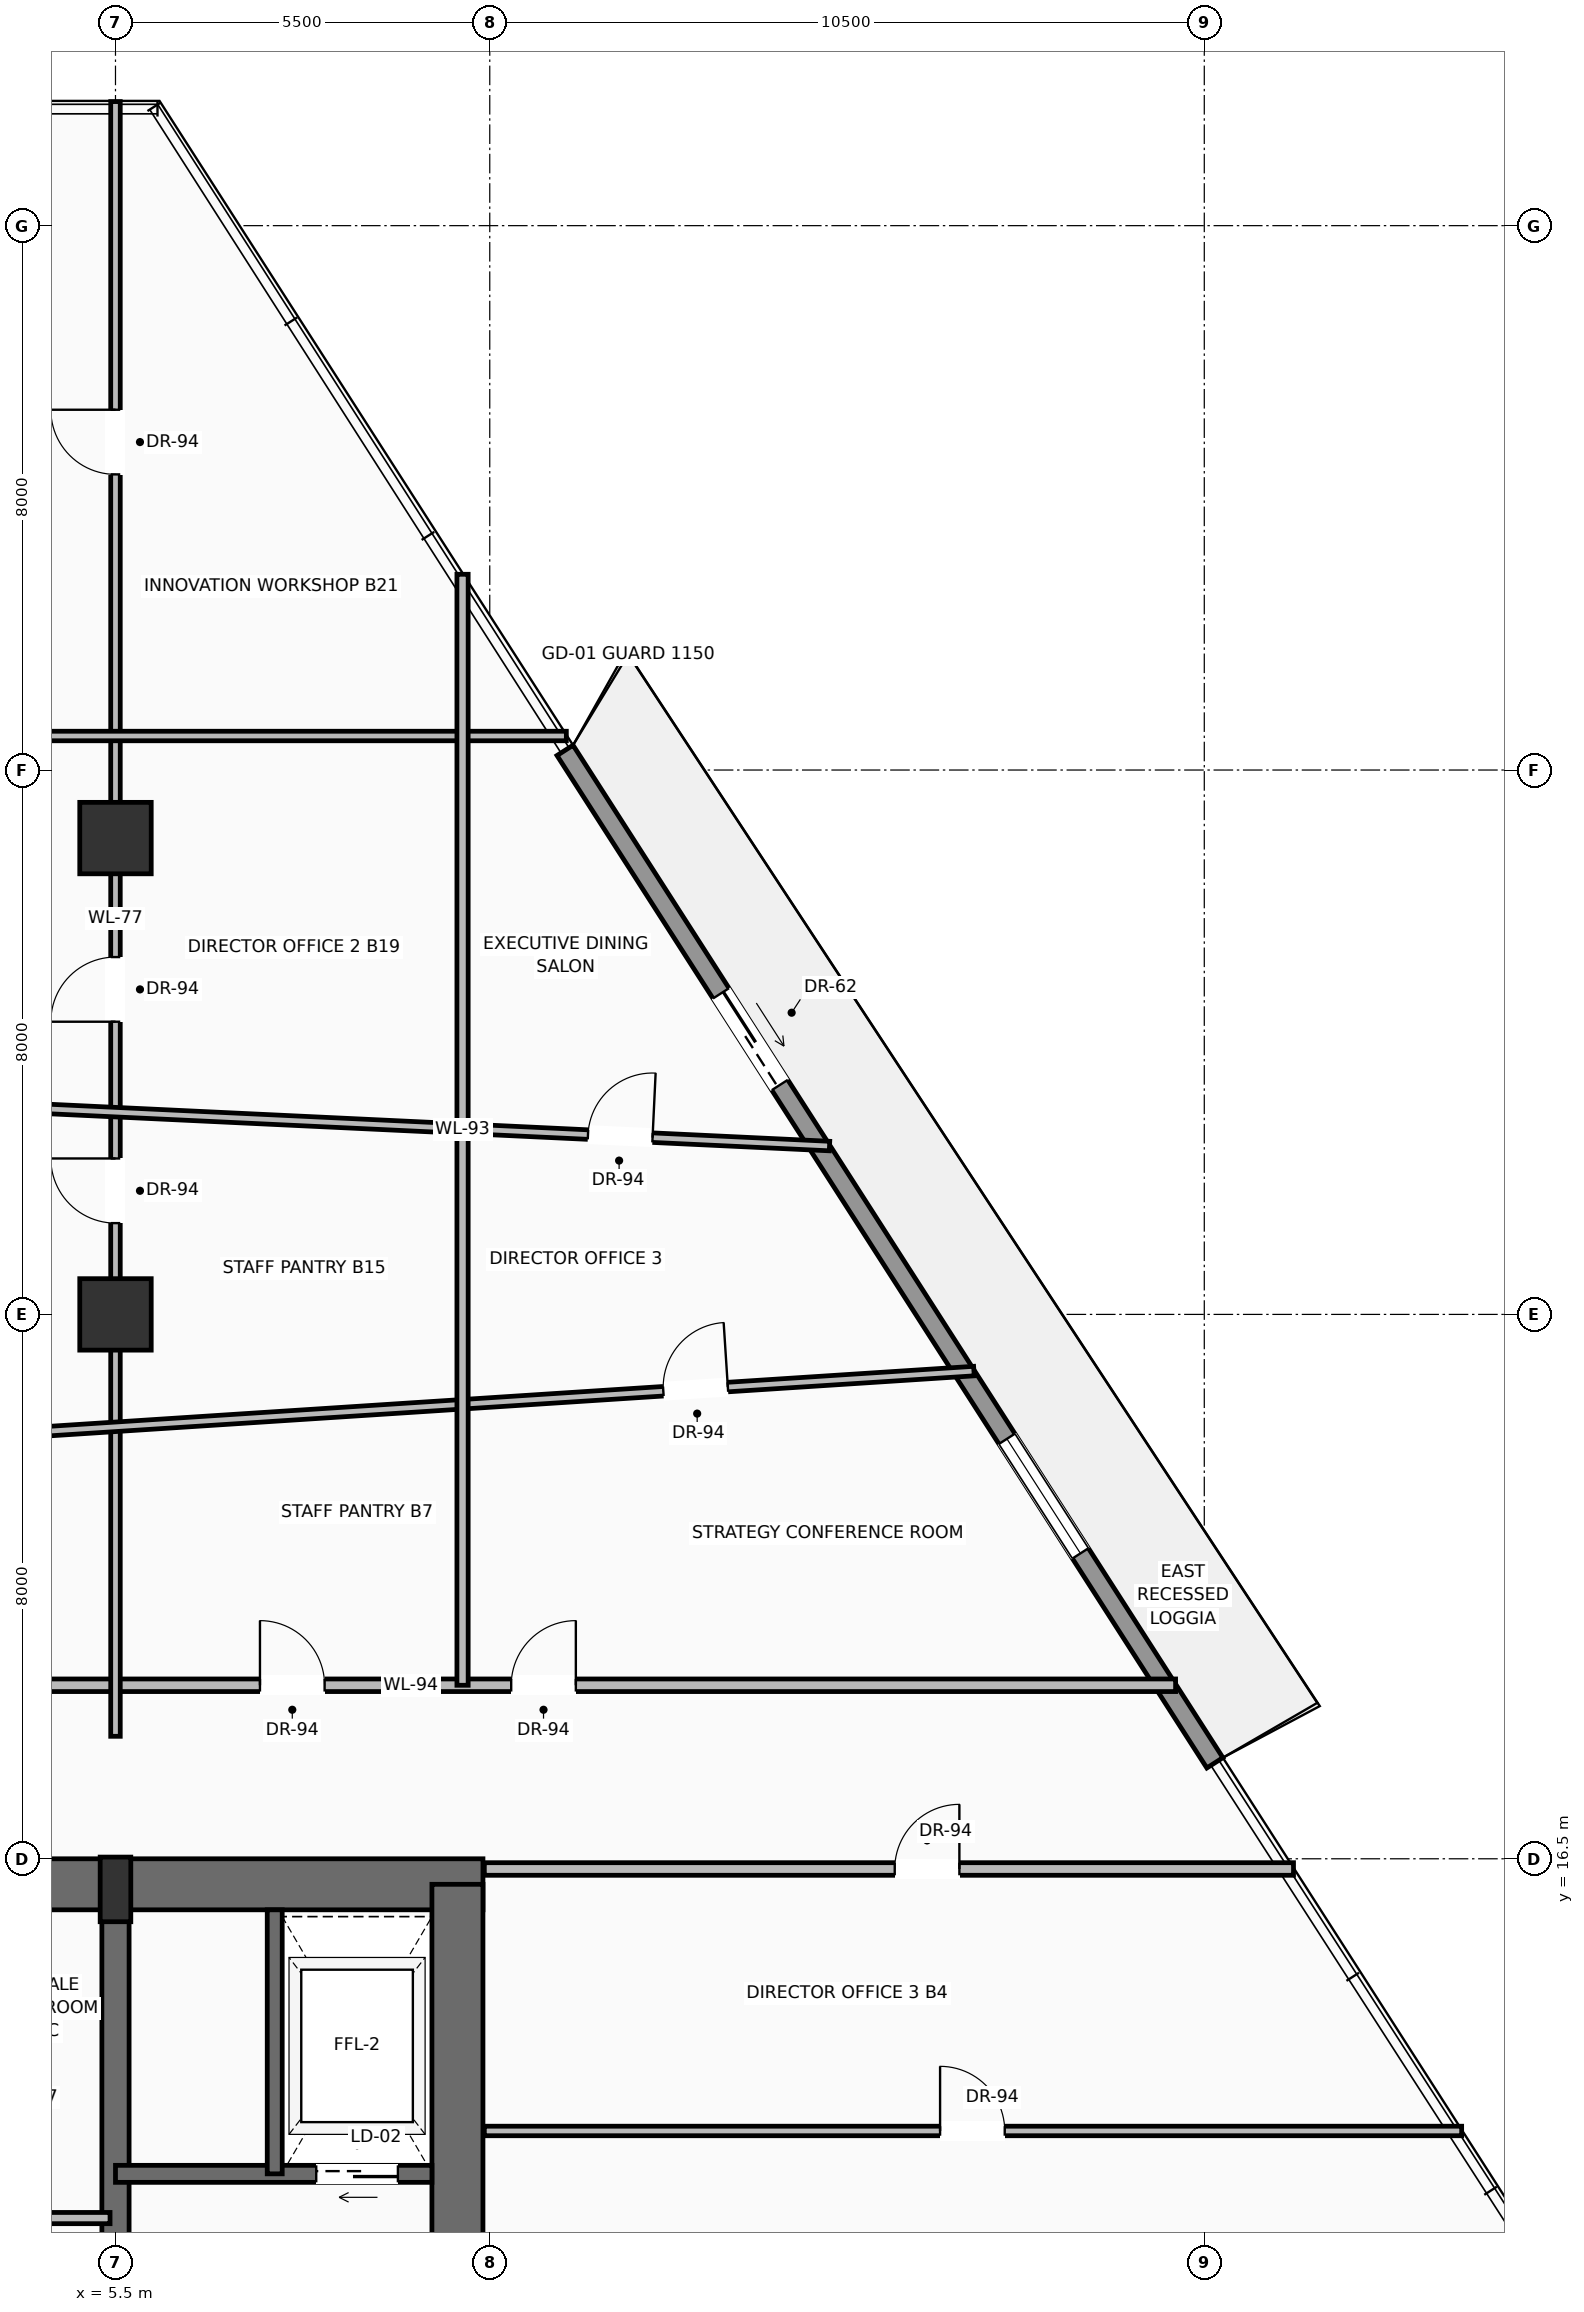
"""IFC4 building model, lengths in metres.
Left out: names, types, materials, properties, quantities, classifications, styles, units other than length and angle.
Written with IfcOpenShell. Run it as: python <this file> out.ifc"""

import sys

from ifc_helpers import new_model, si_unit, direction, frame, frame_2d, origin, origin_2d, place, context, subcontext, project, spatial, rectangle, extrude, source, transform, mapped, element, fill, save


model = new_model("IFC4")
c1 = context("Model", 3, precision=1e-05, world=origin(), true_north=direction((0.0, 1.0)))
c2 = subcontext(c1, "Body", "Model", "MODEL_VIEW")
j1 = project(units=[si_unit("LENGTHUNIT", "METRE"), si_unit("PLANEANGLEUNIT", "RADIAN")], contexts=[c1])
p1 = place(None, origin())
s1 = spatial("IfcSite", under=j1, at=p1, CompositionType="ELEMENT")
p2 = place(p1, origin())
s2 = spatial("IfcBuilding", under=s1, at=p2, CompositionType="ELEMENT")
p3 = place(p2, frame((0.0, 0.0, 113.6)))
s3 = spatial("IfcBuildingStorey", under=s2, at=p3, CompositionType="ELEMENT", Elevation=113.6)
p4 = place(p3, frame((-10.9, 16.125, 0.0), z_axis=(0.0, 0.0, 1.0), x_axis=(1.0, 0.0, 0.0)))
e1 = element("IfcWall", 1, at=p4, inside=s3, PredefinedType="SHEAR", context=c2, shape_type="SweptSolid", body=[
    extrude(rectangle(XDim=21.8, YDim=0.75, at=frame_2d((10.9, 0.0))), origin(), (0.0, 0.0, 1.0), 3.45),
])
p5 = place(p4, frame((3.47, 0.0, 0.0)))
e2 = element("IfcOpeningElement", 2, at=p5, cuts=e1, PredefinedType="OPENING", context=c2, shape_type="SweptSolid", body=[
    extrude(rectangle(XDim=1.3, YDim=2.3, at=frame_2d((0.65, 1.15))), frame((0.0, 0.385, 0.0), z_axis=(0.0, -1.0, 0.0), x_axis=(1.0, 0.0, 0.0)), (0.0, 0.0, 1.0), 0.77),
])
p6 = place(p4, frame((9.9, 0.0, 0.0)))
e3 = element("IfcOpeningElement", 3, at=p6, cuts=e1, PredefinedType="OPENING", context=c2, shape_type="SweptSolid", body=[
    extrude(rectangle(XDim=2.0, YDim=2.4, at=frame_2d((1.0, 1.2))), frame((0.0, 0.385, 0.0), z_axis=(0.0, -1.0, 0.0), x_axis=(1.0, 0.0, 0.0)), (0.0, 0.0, 1.0), 0.77),
])
p7 = place(p3, frame((10.525, 0.475, 0.0), z_axis=(0.0, 0.0, 1.0), x_axis=(0.0, 1.0, 0.0)))
e4 = element("IfcWall", 4, at=p7, inside=s3, PredefinedType="SHEAR", context=c2, shape_type="SweptSolid", body=[
    extrude(rectangle(XDim=15.65, YDim=0.75, at=frame_2d((7.825, 0.0))), origin(), (0.0, 0.0, 1.0), 3.45),
])
p8 = place(p3, frame((5.5, 0.475, 0.0), z_axis=(0.0, 0.0, 1.0), x_axis=(0.0, 1.0, 0.0)))
e5 = element("IfcWall", 5, at=p8, inside=s3, PredefinedType="SHEAR", context=c2, shape_type="SweptSolid", body=[
    extrude(rectangle(XDim=15.65, YDim=0.4, at=frame_2d((7.825, 0.0))), origin(), (0.0, 0.0, 1.0), 3.45),
])
p9 = place(p8, frame((9.025, 0.0, 0.0)))
e6 = element("IfcOpeningElement", 6, at=p9, cuts=e5, PredefinedType="OPENING", context=c2, shape_type="SweptSolid", body=[
    extrude(rectangle(XDim=1.1, YDim=2.2, at=frame_2d((0.55, 1.1))), frame((0.0, 0.21, 0.0), z_axis=(0.0, -1.0, 0.0), x_axis=(1.0, 0.0, 0.0)), (0.0, 0.0, 1.0), 0.42),
])
m1 = source(origin(), c2, "Body", "SweptSolid", [
    extrude(rectangle(XDim=0.45, YDim=0.95, at=origin_2d()), origin(), (0.0, 0.0, 1.0), 3.7),
])
p10 = place(p3, frame((5.5, 16.05, 0.0), z_axis=(0.0, 0.0, 1.0), x_axis=(1.0, 0.0, 0.0)))
e7 = element("IfcColumn", 7, at=p10, inside=s3, PredefinedType="PILASTER", context=c2, shape_type="MappedRepresentation", body=[
    mapped(m1, transform((0.0, 0.0, 0.0), scale=1.0)),
])
m2 = source(origin(), c2, "Body", "SweptSolid", [
    extrude(rectangle(XDim=1.05, YDim=1.05, at=origin_2d()), origin(), (0.0, 0.0, 1.0), 3.7),
])
for number, where, z_axis, x_axis in (
    (8, (5.5, 24.5, 0.0), (0.0, 0.0, 1.0), (1.0, 0.0, 0.0)),
    (9, (5.5, 31.5, 0.0), (0.0, 0.0, 1.0), (1.0, 0.0, 0.0)),
):
    element("IfcColumn", number, at=place(p3, frame(where, z_axis=z_axis, x_axis=x_axis)), inside=s3, PredefinedType="COLUMN", context=c2, shape_type="MappedRepresentation", body=[
        mapped(m2, transform((0.0, 0.0, 0.0), scale=1.0)),
    ])
p11 = place(p3, frame((12.106, 32.789, 0.0), z_axis=(0.0, 0.0, 1.0), x_axis=(0.540123023737, -0.841586073571, 0.0)))
e10 = element("IfcWall", 10, at=p11, inside=s3, PredefinedType="SOLIDWALL", context=c2, shape_type="SweptSolid", body=[
    extrude(rectangle(XDim=17.68, YDim=0.28, at=frame_2d((8.84, 0.0))), origin(), (0.0, 0.0, 1.0), 3.03),
])
p12 = place(p11, frame((4.243, 0.0, 0.0)))
e11 = element("IfcOpeningElement", 11, at=p12, cuts=e10, PredefinedType="OPENING", context=c2, shape_type="SweptSolid", body=[
    extrude(rectangle(XDim=1.6, YDim=2.35, at=frame_2d((0.8, 1.175))), frame((0.0, 0.15, 0.0), z_axis=(0.0, -1.0, 0.0), x_axis=(1.0, 0.0, 0.0)), (0.0, 0.0, 1.0), 0.3),
])
p13 = place(p11, frame((12.022, 0.0, 0.9)))
e12 = element("IfcOpeningElement", 12, at=p13, cuts=e10, PredefinedType="OPENING", context=c2, shape_type="SweptSolid", body=[
    extrude(rectangle(XDim=2.0, YDim=1.85, at=frame_2d((1.0, 0.925))), frame((0.0, 0.15, 0.0), z_axis=(0.0, -1.0, 0.0), x_axis=(1.0, 0.0, 0.0)), (0.0, 0.0, 1.0), 0.3),
])
p14 = place(p3, frame((10.15, 11.87, 0.0), z_axis=(0.0, 0.0, 1.0), x_axis=(-1.0, 0.0, 0.0)))
e13 = element("IfcWall", 13, at=p14, inside=s3, PredefinedType="SOLIDWALL", context=c2, shape_type="SweptSolid", body=[
    extrude(rectangle(XDim=4.65, YDim=0.25, at=frame_2d((2.325, 0.0))), origin(), (0.0, 0.0, 1.0), 3.45),
])
p15 = place(p14, frame((0.5, 0.0, 0.0)))
e14 = element("IfcOpeningElement", 14, at=p15, cuts=e13, PredefinedType="OPENING", context=c2, shape_type="SweptSolid", body=[
    extrude(rectangle(XDim=1.2, YDim=2.25, at=frame_2d((0.6, 1.125))), frame((0.0, 0.135, 0.0), z_axis=(0.0, -1.0, 0.0), x_axis=(1.0, 0.0, 0.0)), (0.0, 0.0, 1.0), 0.27),
])
p16 = place(p3, frame((7.84, 11.87, 0.0), z_axis=(0.0, 0.0, 1.0), x_axis=(0.0, 1.0, 0.0)))
e15 = element("IfcWall", 15, at=p16, inside=s3, PredefinedType="SOLIDWALL", context=c2, shape_type="SweptSolid", body=[
    extrude(rectangle(XDim=3.88, YDim=0.22, at=frame_2d((1.94, 0.0))), origin(), (0.0, 0.0, 1.0), 3.45),
])
p17 = place(p3, frame((3.54, 11.22, 0.0), z_axis=(0.0, 0.0, 1.0), x_axis=(1.0, 0.0, 0.0)))
e16 = element("IfcWall", 16, at=p17, inside=s3, PredefinedType="PARTITIONING", context=c2, shape_type="SweptSolid", body=[
    extrude(rectangle(XDim=1.88, YDim=0.165, at=frame_2d((0.94, 0.0))), origin(), (0.0, 0.0, 1.0), 3.442),
])
p18 = place(p3, frame((10.92, 16.35, 0.0), z_axis=(0.0, 0.0, 1.0), x_axis=(1.0, 0.0, 0.0)))
e17 = element("IfcWall", 17, at=p18, inside=s3, PredefinedType="PARTITIONING", context=c2, shape_type="SweptSolid", body=[
    extrude(rectangle(XDim=11.891, YDim=0.185, at=frame_2d((5.946, 0.0))), origin(), (0.0, 0.0, 1.0), 2.747),
])
p19 = place(p18, frame((6.031, 0.0, 0.0)))
e18 = element("IfcOpeningElement", 18, at=p19, cuts=e17, PredefinedType="OPENING", context=c2, shape_type="SweptSolid", body=[
    extrude(rectangle(XDim=0.95, YDim=2.2, at=frame_2d((0.475, 1.1))), frame((0.0, 0.103, 0.0), z_axis=(0.0, -1.0, 0.0), x_axis=(1.0, 0.0, 0.0)), (0.0, 0.0, 1.0), 0.205),
])
p20 = place(p3, frame((-1.4, 19.05, 0.0), z_axis=(0.0, 0.0, 1.0), x_axis=(1.0, 0.0, 0.0)))
e19 = element("IfcWall", 19, at=p20, inside=s3, PredefinedType="PARTITIONING", context=c2, shape_type="SweptSolid", body=[
    extrude(rectangle(XDim=22.478, YDim=0.185, at=frame_2d((11.239, 0.0))), origin(), (0.0, 0.0, 1.0), 2.747),
])
p21 = place(p20, frame((12.715, 0.0, 0.0)))
e20 = element("IfcOpeningElement", 20, at=p21, cuts=e19, PredefinedType="OPENING", context=c2, shape_type="SweptSolid", body=[
    extrude(rectangle(XDim=0.95, YDim=2.2, at=frame_2d((0.475, 1.1))), frame((0.0, 0.103, 0.0), z_axis=(0.0, -1.0, 0.0), x_axis=(1.0, 0.0, 0.0)), (0.0, 0.0, 1.0), 0.205),
])
p22 = place(p20, frame((3.364, 0.0, 0.0)))
e21 = element("IfcOpeningElement", 21, at=p22, cuts=e19, PredefinedType="OPENING", context=c2, shape_type="SweptSolid", body=[
    extrude(rectangle(XDim=0.95, YDim=2.2, at=frame_2d((0.475, 1.1))), frame((0.0, 0.103, 0.0), z_axis=(0.0, -1.0, 0.0), x_axis=(1.0, 0.0, 0.0)), (0.0, 0.0, 1.0), 0.205),
])
p23 = place(p20, frame((9.023, 0.0, 0.0)))
e22 = element("IfcOpeningElement", 22, at=p23, cuts=e19, PredefinedType="OPENING", context=c2, shape_type="SweptSolid", body=[
    extrude(rectangle(XDim=0.95, YDim=2.2, at=frame_2d((0.475, 1.1))), frame((0.0, 0.103, 0.0), z_axis=(0.0, -1.0, 0.0), x_axis=(1.0, 0.0, 0.0)), (0.0, 0.0, 1.0), 0.205),
])
p24 = place(p3, frame((5.5, 18.3, 0.0), z_axis=(0.0, 0.0, 1.0), x_axis=(0.0, 1.0, 0.0)))
e23 = element("IfcWall", 23, at=p24, inside=s3, PredefinedType="PARTITIONING", context=c2, shape_type="SweptSolid", body=[
    extrude(rectangle(XDim=24.023, YDim=0.14, at=frame_2d((12.012, 0.0))), origin(), (0.0, 0.0, 1.0), 2.747),
])
p25 = place(p24, frame((10.501, 0.0, 0.0)))
e24 = element("IfcOpeningElement", 24, at=p25, cuts=e23, PredefinedType="OPENING", context=c2, shape_type="SweptSolid", body=[
    extrude(rectangle(XDim=0.95, YDim=2.2, at=frame_2d((0.475, 1.1))), frame((0.0, 0.08, 0.0), z_axis=(0.0, -1.0, 0.0), x_axis=(1.0, 0.0, 0.0)), (0.0, 0.0, 1.0), 0.16),
])
p26 = place(p24, frame((18.545, 0.0, 0.0)))
e25 = element("IfcOpeningElement", 25, at=p26, cuts=e23, PredefinedType="OPENING", context=c2, shape_type="SweptSolid", body=[
    extrude(rectangle(XDim=0.95, YDim=2.2, at=frame_2d((0.475, 1.1))), frame((0.0, 0.08, 0.0), z_axis=(0.0, -1.0, 0.0), x_axis=(1.0, 0.0, 0.0)), (0.0, 0.0, 1.0), 0.16),
])
p27 = place(p24, frame((7.542, 0.0, 0.0)))
e26 = element("IfcOpeningElement", 26, at=p27, cuts=e23, PredefinedType="OPENING", context=c2, shape_type="SweptSolid", body=[
    extrude(rectangle(XDim=0.95, YDim=2.2, at=frame_2d((0.475, 1.1))), frame((0.0, 0.08, 0.0), z_axis=(0.0, -1.0, 0.0), x_axis=(1.0, 0.0, 0.0)), (0.0, 0.0, 1.0), 0.16),
])
p28 = place(p3, frame((-1.4, 22.4, 0.0), z_axis=(0.0, 0.0, 1.0), x_axis=(0.99789792226, 0.064805375933, 0.0)))
e27 = element("IfcWall", 27, at=p28, inside=s3, PredefinedType="PARTITIONING", context=c2, shape_type="SweptSolid", body=[
    extrude(rectangle(XDim=19.556, YDim=0.14, at=frame_2d((9.778, 0.0))), origin(), (0.0, 0.0, 1.0), 2.747),
])
p29 = place(p28, frame((14.982, 0.0, 0.0)))
e28 = element("IfcOpeningElement", 28, at=p29, cuts=e27, PredefinedType="OPENING", context=c2, shape_type="SweptSolid", body=[
    extrude(rectangle(XDim=0.95, YDim=2.2, at=frame_2d((0.475, 1.1))), frame((0.0, 0.08, 0.0), z_axis=(0.0, -1.0, 0.0), x_axis=(1.0, 0.0, 0.0)), (0.0, 0.0, 1.0), 0.16),
])
p30 = place(p3, frame((-1.4, 27.8, 0.0), z_axis=(0.0, 0.0, 1.0), x_axis=(0.998874409944, -0.047433249517, 0.0)))
e29 = element("IfcWall", 29, at=p30, inside=s3, PredefinedType="PARTITIONING", context=c2, shape_type="SweptSolid", body=[
    extrude(rectangle(XDim=17.412, YDim=0.14, at=frame_2d((8.706, 0.0))), origin(), (0.0, 0.0, 1.0), 2.747),
])
p31 = place(p30, frame((13.859, 0.0, 0.0)))
e30 = element("IfcOpeningElement", 30, at=p31, cuts=e29, PredefinedType="OPENING", context=c2, shape_type="SweptSolid", body=[
    extrude(rectangle(XDim=0.95, YDim=2.2, at=frame_2d((0.475, 1.1))), frame((0.0, 0.08, 0.0), z_axis=(0.0, -1.0, 0.0), x_axis=(1.0, 0.0, 0.0)), (0.0, 0.0, 1.0), 0.16),
])
p32 = place(p3, frame((-1.4, 33.0, 0.0), z_axis=(0.0, 0.0, 1.0), x_axis=(1.0, 0.0, 0.0)))
e31 = element("IfcWall", 31, at=p32, inside=s3, PredefinedType="PARTITIONING", context=c2, shape_type="SweptSolid", body=[
    extrude(rectangle(XDim=13.525, YDim=0.14, at=frame_2d((6.763, 0.0))), origin(), (0.0, 0.0, 1.0), 2.747),
])
p33 = place(p3, frame((10.6, 19.05, 0.0), z_axis=(0.0, 0.0, 1.0), x_axis=(0.0, 1.0, 0.0)))
e32 = element("IfcWall", 32, at=p33, inside=s3, PredefinedType="PARTITIONING", context=c2, shape_type="SweptSolid", body=[
    extrude(rectangle(XDim=16.327, YDim=0.165, at=frame_2d((8.163, 0.0))), origin(), (0.0, 0.0, 1.0), 2.747),
])
p34 = place(p3, frame((10.92, 12.5, 0.0), z_axis=(0.0, 0.0, 1.0), x_axis=(1.0, 0.0, 0.0)))
e33 = element("IfcWall", 33, at=p34, inside=s3, PredefinedType="PARTITIONING", context=c2, shape_type="SweptSolid", body=[
    extrude(rectangle(XDim=14.362, YDim=0.14, at=frame_2d((7.181, 0.0))), origin(), (0.0, 0.0, 1.0), 3.442),
])
p35 = place(p34, frame((6.698, 0.0, 0.0)))
e34 = element("IfcOpeningElement", 34, at=p35, cuts=e33, PredefinedType="OPENING", context=c2, shape_type="SweptSolid", body=[
    extrude(rectangle(XDim=0.95, YDim=2.2, at=frame_2d((0.475, 1.1))), frame((0.0, 0.08, 0.0), z_axis=(0.0, -1.0, 0.0), x_axis=(1.0, 0.0, 0.0)), (0.0, 0.0, 1.0), 0.16),
])
m3 = source(origin(), c2, "Body", "SweptSolid", [
    extrude(rectangle(XDim=1.6, YDim=2.35, at=frame_2d((0.8, 1.175))), frame((0.0, 0.025, 0.0), z_axis=(0.0, -1.0, 0.0), x_axis=(1.0, 0.0, 0.0)), (0.0, 0.0, 1.0), 0.05),
])
p36 = place(p12, origin())
e35 = element("IfcDoor", 35, at=p36, inside=s3, OperationType="SLIDING_TO_RIGHT", PredefinedType="DOOR", context=c2, shape_type="MappedRepresentation", body=[
    mapped(m3, transform((0.0, 0.0, 0.0), scale=1.0)),
])
fill(e11, e35)
m4 = source(origin(), c2, "Body", "SweptSolid", [
    extrude(rectangle(XDim=2.0, YDim=1.85, at=frame_2d((1.0, 0.925))), frame((0.0, 0.03, 0.0), z_axis=(0.0, -1.0, 0.0), x_axis=(1.0, 0.0, 0.0)), (0.0, 0.0, 1.0), 0.06),
])
p37 = place(p13, origin())
e36 = element("IfcWindow", 36, at=p37, inside=s3, PartitioningType="SINGLE_PANEL", PredefinedType="WINDOW", context=c2, shape_type="MappedRepresentation", body=[
    mapped(m4, transform((0.0, 0.0, 0.0), scale=1.0)),
])
fill(e12, e36)
m5 = source(origin(), c2, "Body", "SweptSolid", [
    extrude(rectangle(XDim=1.2, YDim=2.25, at=frame_2d((0.6, 1.125))), frame((0.0, 0.025, 0.0), z_axis=(0.0, -1.0, 0.0), x_axis=(1.0, 0.0, 0.0)), (0.0, 0.0, 1.0), 0.05),
])
p38 = place(p15, origin())
e37 = element("IfcDoor", 37, at=p38, inside=s3, OperationType="SLIDING_TO_RIGHT", PredefinedType="DOOR", context=c2, shape_type="MappedRepresentation", body=[
    mapped(m5, transform((0.0, 0.0, 0.0), scale=1.0)),
])
fill(e14, e37)
m6 = source(origin(), c2, "Body", "SweptSolid", [
    extrude(rectangle(XDim=0.95, YDim=2.2, at=frame_2d((0.475, 1.1))), frame((0.0, 0.025, 0.0), z_axis=(0.0, -1.0, 0.0), x_axis=(1.0, 0.0, 0.0)), (0.0, 0.0, 1.0), 0.05),
])
p39 = place(p19, origin())
e38 = element("IfcDoor", 38, at=p39, inside=s3, OperationType="SINGLE_SWING_RIGHT", PredefinedType="DOOR", context=c2, shape_type="MappedRepresentation", body=[
    mapped(m6, transform((0.0, 0.0, 0.0), scale=1.0)),
])
fill(e18, e38)
p40 = place(p21, origin())
e39 = element("IfcDoor", 39, at=p40, inside=s3, OperationType="SINGLE_SWING_RIGHT", PredefinedType="DOOR", context=c2, shape_type="MappedRepresentation", body=[
    mapped(m6, transform((0.0, 0.0, 0.0), scale=1.0)),
])
fill(e20, e39)
p41 = place(p35, origin())
e40 = element("IfcDoor", 40, at=p41, inside=s3, OperationType="SINGLE_SWING_LEFT", PredefinedType="DOOR", context=c2, shape_type="MappedRepresentation", body=[
    mapped(m6, transform((0.0, 0.0, 0.0), scale=1.0)),
])
fill(e34, e40)
p42 = place(p23, origin())
e41 = element("IfcDoor", 41, at=p42, inside=s3, OperationType="SINGLE_SWING_LEFT", PredefinedType="DOOR", context=c2, shape_type="MappedRepresentation", body=[
    mapped(m6, transform((0.0, 0.0, 0.0), scale=1.0)),
])
fill(e22, e41)
p43 = place(p29, origin())
e42 = element("IfcDoor", 42, at=p43, inside=s3, OperationType="SINGLE_SWING_RIGHT", PredefinedType="DOOR", context=c2, shape_type="MappedRepresentation", body=[
    mapped(m6, transform((0.0, 0.0, 0.0), scale=1.0)),
])
fill(e28, e42)
p44 = place(p25, origin())
e43 = element("IfcDoor", 43, at=p44, inside=s3, OperationType="SINGLE_SWING_LEFT", PredefinedType="DOOR", context=c2, shape_type="MappedRepresentation", body=[
    mapped(m6, transform((0.0, 0.0, 0.0), scale=1.0)),
])
fill(e24, e43)
p45 = place(p26, origin())
e44 = element("IfcDoor", 44, at=p45, inside=s3, OperationType="SINGLE_SWING_RIGHT", PredefinedType="DOOR", context=c2, shape_type="MappedRepresentation", body=[
    mapped(m6, transform((0.0, 0.0, 0.0), scale=1.0)),
])
fill(e25, e44)
p46 = place(p27, origin())
e45 = element("IfcDoor", 45, at=p46, inside=s3, OperationType="SINGLE_SWING_RIGHT", PredefinedType="DOOR", context=c2, shape_type="MappedRepresentation", body=[
    mapped(m6, transform((0.0, 0.0, 0.0), scale=1.0)),
])
fill(e26, e45)
p47 = place(p31, origin())
e46 = element("IfcDoor", 46, at=p47, inside=s3, OperationType="SINGLE_SWING_RIGHT", PredefinedType="DOOR", context=c2, shape_type="MappedRepresentation", body=[
    mapped(m6, transform((0.0, 0.0, 0.0), scale=1.0)),
])
fill(e30, e46)
save(model, sys.argv[1])
